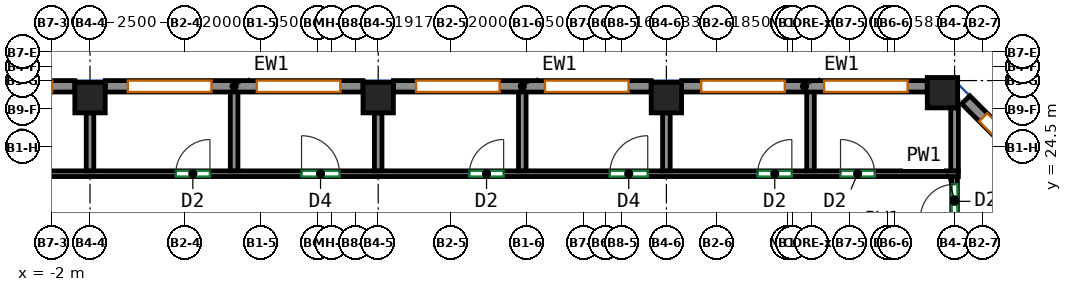
"""IFC4 building model, lengths in metres.
Left out: names, types, materials, properties, quantities, classifications, styles, units other than length and angle.
Written with IfcOpenShell. Run it as: python <this file> out.ifc"""

import sys

from ifc_helpers import new_model, si_unit, direction, frame, frame_2d, origin, origin_2d, place, context, subcontext, project, spatial, rectangle, extrude, source, transform, mapped, element, fill, save


model = new_model("IFC4")
c1 = context("Model", 3, precision=1e-05, world=origin(), true_north=direction((0.0, 1.0)))
c2 = subcontext(c1, "Body", "Model", "MODEL_VIEW")
j1 = project(units=[si_unit("LENGTHUNIT", "METRE"), si_unit("PLANEANGLEUNIT", "RADIAN")], contexts=[c1])
p1 = place(None, origin())
s1 = spatial("IfcSite", under=j1, at=p1, CompositionType="ELEMENT")
p2 = place(p1, origin())
s2 = spatial("IfcBuilding", under=s1, at=p2, CompositionType="ELEMENT")
p3 = place(p2, frame((0.0, 0.0, 171.9)))
s3 = spatial("IfcBuildingStorey", under=s2, at=p3, CompositionType="ELEMENT", Elevation=171.9)
m1 = source(origin(), c2, "Body", "SweptSolid", [
    extrude(rectangle(XDim=0.8, YDim=0.8, at=origin_2d()), origin(), (0.0, 0.0, 1.0), 3.12),
])
for number, where, z_axis, x_axis in (
    (1, (-1.0, 25.8, 0.0), (0.0, 0.0, 1.0), (1.0, 0.0, 0.0)),
    (2, (6.583, 25.8, 0.0), (0.0, 0.0, 1.0), (1.0, 0.0, 0.0)),
    (3, (14.167, 25.8, 0.0), (0.0, 0.0, 1.0), (1.0, 0.0, 0.0)),
    (4, (21.432, 25.932, 0.0), (0.0, 0.0, 1.0), (1.0, 0.0, 0.0)),
):
    element("IfcColumn", number, at=place(p3, frame(where, z_axis=z_axis, x_axis=x_axis)), inside=s3, PredefinedType="COLUMN", context=c2, shape_type="MappedRepresentation", body=[
        mapped(m1, transform((0.0, 0.0, 0.0))),
    ])
m2 = source(origin(), c2, "Body", "SweptSolid", [
    extrude(rectangle(XDim=3.5, YDim=0.3, at=frame_2d((1.75, 0.0))), origin(), (0.0, 0.0, 1.0), 3.12),
])
p4 = place(p3, frame((24.519, 23.269, 0.0), z_axis=(0.0, 0.0, 1.0), x_axis=(-0.70707190453, 0.707141656123, 0.0)))
e5 = element("IfcWall", 5, at=p4, inside=s3, PredefinedType="SOLIDWALL", context=c2, shape_type="MappedRepresentation", body=[
    mapped(m2, transform((0.0, 0.0, 0.0))),
])
p5 = place(p4, frame((0.65, 0.0, 0.85)))
e6 = element("IfcOpeningElement", 6, at=p5, cuts=e5, PredefinedType="OPENING", context=c2, shape_type="SweptSolid", body=[
    extrude(rectangle(XDim=2.2, YDim=1.95, at=frame_2d((1.1, 0.975))), frame((0.0, 0.16, 0.0), z_axis=(0.0, -1.0, 0.0), x_axis=(1.0, 0.0, 0.0)), (0.0, 0.0, 1.0), 0.32),
])
m3 = source(origin(), c2, "Body", "SweptSolid", [
    extrude(rectangle(XDim=6.465, YDim=0.3, at=frame_2d((3.232, 0.0))), origin(), (0.0, 0.0, 1.0), 3.12),
])
p6 = place(p3, frame((21.032, 26.1, 0.0), z_axis=(0.0, 0.0, 1.0), x_axis=(-1.0, 0.0, 0.0)))
e7 = element("IfcWall", 7, at=p6, inside=s3, PredefinedType="SOLIDWALL", context=c2, shape_type="MappedRepresentation", body=[
    mapped(m3, transform((0.0, 0.0, 0.0))),
])
p7 = place(p6, frame((0.516, 0.0, 0.85)))
e8 = element("IfcOpeningElement", 8, at=p7, cuts=e7, PredefinedType="OPENING", context=c2, shape_type="SweptSolid", body=[
    extrude(rectangle(XDim=2.2, YDim=1.95, at=frame_2d((1.1, 0.975))), frame((0.0, 0.16, 0.0), z_axis=(0.0, -1.0, 0.0), x_axis=(1.0, 0.0, 0.0)), (0.0, 0.0, 1.0), 0.32),
])
p8 = place(p6, frame((3.749, 0.0, 0.85)))
e9 = element("IfcOpeningElement", 9, at=p8, cuts=e7, PredefinedType="OPENING", context=c2, shape_type="SweptSolid", body=[
    extrude(rectangle(XDim=2.2, YDim=1.95, at=frame_2d((1.1, 0.975))), frame((0.0, 0.16, 0.0), z_axis=(0.0, -1.0, 0.0), x_axis=(1.0, 0.0, 0.0)), (0.0, 0.0, 1.0), 0.32),
])
m4 = source(origin(), c2, "Body", "SweptSolid", [
    extrude(rectangle(XDim=6.783, YDim=0.3, at=frame_2d((3.392, 0.0))), origin(), (0.0, 0.0, 1.0), 3.12),
])
p9 = place(p3, frame((13.767, 26.1, 0.0), z_axis=(0.0, 0.0, 1.0), x_axis=(-1.0, 0.0, 0.0)))
e10 = element("IfcWall", 10, at=p9, inside=s3, PredefinedType="SOLIDWALL", context=c2, shape_type="MappedRepresentation", body=[
    mapped(m4, transform((0.0, 0.0, 0.0))),
])
p10 = place(p9, frame((0.596, 0.0, 0.85)))
e11 = element("IfcOpeningElement", 11, at=p10, cuts=e10, PredefinedType="OPENING", context=c2, shape_type="SweptSolid", body=[
    extrude(rectangle(XDim=2.2, YDim=1.95, at=frame_2d((1.1, 0.975))), frame((0.0, 0.16, 0.0), z_axis=(0.0, -1.0, 0.0), x_axis=(1.0, 0.0, 0.0)), (0.0, 0.0, 1.0), 0.32),
])
p11 = place(p9, frame((3.988, 0.0, 0.85)))
e12 = element("IfcOpeningElement", 12, at=p11, cuts=e10, PredefinedType="OPENING", context=c2, shape_type="SweptSolid", body=[
    extrude(rectangle(XDim=2.2, YDim=1.95, at=frame_2d((1.1, 0.975))), frame((0.0, 0.16, 0.0), z_axis=(0.0, -1.0, 0.0), x_axis=(1.0, 0.0, 0.0)), (0.0, 0.0, 1.0), 0.32),
])
m5 = source(origin(), c2, "Body", "SweptSolid", [
    extrude(rectangle(XDim=6.783, YDim=0.3, at=frame_2d((3.392, 0.0))), origin(), (0.0, 0.0, 1.0), 3.12),
])
p12 = place(p3, frame((6.183, 26.1, 0.0), z_axis=(0.0, 0.0, 1.0), x_axis=(-1.0, 0.0, 0.0)))
e13 = element("IfcWall", 13, at=p12, inside=s3, PredefinedType="SOLIDWALL", context=c2, shape_type="MappedRepresentation", body=[
    mapped(m5, transform((0.0, 0.0, 0.0))),
])
p13 = place(p12, frame((0.596, 0.0, 0.85)))
e14 = element("IfcOpeningElement", 14, at=p13, cuts=e13, PredefinedType="OPENING", context=c2, shape_type="SweptSolid", body=[
    extrude(rectangle(XDim=2.2, YDim=1.95, at=frame_2d((1.1, 0.975))), frame((0.0, 0.16, 0.0), z_axis=(0.0, -1.0, 0.0), x_axis=(1.0, 0.0, 0.0)), (0.0, 0.0, 1.0), 0.32),
])
p14 = place(p12, frame((3.988, 0.0, 0.85)))
e15 = element("IfcOpeningElement", 15, at=p14, cuts=e13, PredefinedType="OPENING", context=c2, shape_type="SweptSolid", body=[
    extrude(rectangle(XDim=2.2, YDim=1.95, at=frame_2d((1.1, 0.975))), frame((0.0, 0.16, 0.0), z_axis=(0.0, -1.0, 0.0), x_axis=(1.0, 0.0, 0.0)), (0.0, 0.0, 1.0), 0.32),
])
p15 = place(p3, frame((-1.4, 26.1, 0.0), z_axis=(0.0, 0.0, 1.0), x_axis=(-1.0, 0.0, 0.0)))
e16 = element("IfcWall", 16, at=p15, inside=s3, PredefinedType="SOLIDWALL", context=c2, shape_type="MappedRepresentation", body=[
    mapped(m5, transform((0.0, 0.0, 0.0))),
])
p16 = place(p15, frame((0.596, 0.0, 0.85)))
e17 = element("IfcOpeningElement", 17, at=p16, cuts=e16, PredefinedType="OPENING", context=c2, shape_type="SweptSolid", body=[
    extrude(rectangle(XDim=2.2, YDim=1.95, at=frame_2d((1.1, 0.975))), frame((0.0, 0.16, 0.0), z_axis=(0.0, -1.0, 0.0), x_axis=(1.0, 0.0, 0.0)), (0.0, 0.0, 1.0), 0.32),
])
p17 = place(p15, frame((3.988, 0.0, 0.85)))
e18 = element("IfcOpeningElement", 18, at=p17, cuts=e16, PredefinedType="OPENING", context=c2, shape_type="SweptSolid", body=[
    extrude(rectangle(XDim=2.2, YDim=1.95, at=frame_2d((1.1, 0.975))), frame((0.0, 0.16, 0.0), z_axis=(0.0, -1.0, 0.0), x_axis=(1.0, 0.0, 0.0)), (0.0, 0.0, 1.0), 0.32),
])
p18 = place(p3, frame((21.75, 22.503, 0.0), z_axis=(0.0, 0.0, 1.0), x_axis=(0.0, 1.0, 0.0)))
e19 = element("IfcWall", 19, at=p18, inside=s3, PredefinedType="PARTITIONING", context=c2, shape_type="SweptSolid", body=[
    extrude(rectangle(XDim=1.222, YDim=0.15, at=frame_2d((0.611, 0.0))), origin(), (0.0, 0.0, 1.0), 3.12),
])
p19 = place(p18, frame((0.12, 0.0, 0.0)))
e20 = element("IfcOpeningElement", 20, at=p19, cuts=e19, PredefinedType="OPENING", context=c2, shape_type="SweptSolid", body=[
    extrude(rectangle(XDim=0.9, YDim=2.1, at=frame_2d((0.45, 1.05))), frame((0.0, 0.085, 0.0), z_axis=(0.0, -1.0, 0.0), x_axis=(1.0, 0.0, 0.0)), (0.0, 0.0, 1.0), 0.17),
])
p20 = place(p3, frame((-20.059, 23.8, 0.0), z_axis=(0.0, 0.0, 1.0), x_axis=(1.0, 0.0, 0.0)))
e21 = element("IfcWall", 21, at=p20, inside=s3, PredefinedType="PARTITIONING", context=c2, shape_type="SweptSolid", body=[
    extrude(rectangle(XDim=41.909, YDim=0.15, at=frame_2d((20.955, 0.0))), origin(), (0.0, 0.0, 1.0), 3.12),
])
p21 = place(p20, frame((2.101, 0.0, 0.0)))
e22 = element("IfcOpeningElement", 22, at=p21, cuts=e21, PredefinedType="OPENING", context=c2, shape_type="SweptSolid", body=[
    extrude(rectangle(XDim=0.9, YDim=2.1, at=frame_2d((0.45, 1.05))), frame((0.0, 0.085, 0.0), z_axis=(0.0, -1.0, 0.0), x_axis=(1.0, 0.0, 0.0)), (0.0, 0.0, 1.0), 0.17),
])
p22 = place(p20, frame((4.585, 0.0, 0.0)))
e23 = element("IfcOpeningElement", 23, at=p22, cuts=e21, PredefinedType="OPENING", context=c2, shape_type="SweptSolid", body=[
    extrude(rectangle(XDim=1.0, YDim=2.1, at=frame_2d((0.5, 1.05))), frame((0.0, 0.085, 0.0), z_axis=(0.0, -1.0, 0.0), x_axis=(1.0, 0.0, 0.0)), (0.0, 0.0, 1.0), 0.17),
])
p23 = place(p20, frame((8.175, 0.0, 0.0)))
e24 = element("IfcOpeningElement", 24, at=p23, cuts=e21, PredefinedType="OPENING", context=c2, shape_type="SweptSolid", body=[
    extrude(rectangle(XDim=0.9, YDim=2.1, at=frame_2d((0.45, 1.05))), frame((0.0, 0.085, 0.0), z_axis=(0.0, -1.0, 0.0), x_axis=(1.0, 0.0, 0.0)), (0.0, 0.0, 1.0), 0.17),
])
p24 = place(p20, frame((13.173, 0.0, 0.0)))
e25 = element("IfcOpeningElement", 25, at=p24, cuts=e21, PredefinedType="OPENING", context=c2, shape_type="SweptSolid", body=[
    extrude(rectangle(XDim=1.0, YDim=2.1, at=frame_2d((0.5, 1.05))), frame((0.0, 0.085, 0.0), z_axis=(0.0, -1.0, 0.0), x_axis=(1.0, 0.0, 0.0)), (0.0, 0.0, 1.0), 0.17),
])
p25 = place(p20, frame((15.658, 0.0, 0.0)))
e26 = element("IfcOpeningElement", 26, at=p25, cuts=e21, PredefinedType="OPENING", context=c2, shape_type="SweptSolid", body=[
    extrude(rectangle(XDim=0.9, YDim=2.1, at=frame_2d((0.45, 1.05))), frame((0.0, 0.085, 0.0), z_axis=(0.0, -1.0, 0.0), x_axis=(1.0, 0.0, 0.0)), (0.0, 0.0, 1.0), 0.17),
])
p26 = place(p20, frame((21.315, 0.0, 0.0)))
e27 = element("IfcOpeningElement", 27, at=p26, cuts=e21, PredefinedType="OPENING", context=c2, shape_type="SweptSolid", body=[
    extrude(rectangle(XDim=0.9, YDim=2.1, at=frame_2d((0.45, 1.05))), frame((0.0, 0.085, 0.0), z_axis=(0.0, -1.0, 0.0), x_axis=(1.0, 0.0, 0.0)), (0.0, 0.0, 1.0), 0.17),
])
p27 = place(p20, frame((24.625, 0.0, 0.0)))
e28 = element("IfcOpeningElement", 28, at=p27, cuts=e21, PredefinedType="OPENING", context=c2, shape_type="SweptSolid", body=[
    extrude(rectangle(XDim=1.0, YDim=2.1, at=frame_2d((0.5, 1.05))), frame((0.0, 0.085, 0.0), z_axis=(0.0, -1.0, 0.0), x_axis=(1.0, 0.0, 0.0)), (0.0, 0.0, 1.0), 0.17),
])
p28 = place(p20, frame((29.043, 0.0, 0.0)))
e29 = element("IfcOpeningElement", 29, at=p28, cuts=e21, PredefinedType="OPENING", context=c2, shape_type="SweptSolid", body=[
    extrude(rectangle(XDim=0.9, YDim=2.1, at=frame_2d((0.45, 1.05))), frame((0.0, 0.085, 0.0), z_axis=(0.0, -1.0, 0.0), x_axis=(1.0, 0.0, 0.0)), (0.0, 0.0, 1.0), 0.17),
])
p29 = place(p20, frame((32.735, 0.0, 0.0)))
e30 = element("IfcOpeningElement", 30, at=p29, cuts=e21, PredefinedType="OPENING", context=c2, shape_type="SweptSolid", body=[
    extrude(rectangle(XDim=1.0, YDim=2.1, at=frame_2d((0.5, 1.05))), frame((0.0, 0.085, 0.0), z_axis=(0.0, -1.0, 0.0), x_axis=(1.0, 0.0, 0.0)), (0.0, 0.0, 1.0), 0.17),
])
p30 = place(p20, frame((36.627, 0.0, 0.0)))
e31 = element("IfcOpeningElement", 31, at=p30, cuts=e21, PredefinedType="OPENING", context=c2, shape_type="SweptSolid", body=[
    extrude(rectangle(XDim=0.9, YDim=2.1, at=frame_2d((0.45, 1.05))), frame((0.0, 0.085, 0.0), z_axis=(0.0, -1.0, 0.0), x_axis=(1.0, 0.0, 0.0)), (0.0, 0.0, 1.0), 0.17),
])
p31 = place(p20, frame((38.808, 0.0, 0.0)))
e32 = element("IfcOpeningElement", 32, at=p31, cuts=e21, PredefinedType="OPENING", context=c2, shape_type="SweptSolid", body=[
    extrude(rectangle(XDim=0.9, YDim=2.1, at=frame_2d((0.45, 1.05))), frame((0.0, 0.085, 0.0), z_axis=(0.0, -1.0, 0.0), x_axis=(1.0, 0.0, 0.0)), (0.0, 0.0, 1.0), 0.17),
])
p32 = place(p3, frame((21.75, 25.532, 0.0), z_axis=(0.0, 0.0, 1.0), x_axis=(0.0, -1.0, 0.0)))
e33 = element("IfcWall", 33, at=p32, inside=s3, PredefinedType="PARTITIONING", context=c2, shape_type="SweptSolid", body=[
    extrude(rectangle(XDim=1.655, YDim=0.2, at=frame_2d((0.828, 0.0))), origin(), (0.0, 0.0, 1.0), 3.12),
])
p33 = place(p3, frame((-1.0, 23.877, 0.0), z_axis=(0.0, 0.0, 1.0), x_axis=(0.0, 1.0, 0.0)))
e34 = element("IfcWall", 34, at=p33, inside=s3, PredefinedType="PARTITIONING", context=c2, shape_type="SweptSolid", body=[
    extrude(rectangle(XDim=1.523, YDim=0.2, at=frame_2d((0.761, 0.0))), origin(), (0.0, 0.0, 1.0), 3.12),
])
p34 = place(p3, frame((2.792, 23.877, 0.0), z_axis=(0.0, 0.0, 1.0), x_axis=(0.0, 1.0, 0.0)))
e35 = element("IfcWall", 35, at=p34, inside=s3, PredefinedType="PARTITIONING", context=c2, shape_type="SweptSolid", body=[
    extrude(rectangle(XDim=2.123, YDim=0.2, at=frame_2d((1.062, 0.0))), origin(), (0.0, 0.0, 1.0), 3.12),
])
p35 = place(p3, frame((6.583, 23.877, 0.0), z_axis=(0.0, 0.0, 1.0), x_axis=(0.0, 1.0, 0.0)))
e36 = element("IfcWall", 36, at=p35, inside=s3, PredefinedType="PARTITIONING", context=c2, shape_type="SweptSolid", body=[
    extrude(rectangle(XDim=1.523, YDim=0.2, at=frame_2d((0.761, 0.0))), origin(), (0.0, 0.0, 1.0), 3.12),
])
p36 = place(p3, frame((10.375, 23.877, 0.0), z_axis=(0.0, 0.0, 1.0), x_axis=(0.0, 1.0, 0.0)))
e37 = element("IfcWall", 37, at=p36, inside=s3, PredefinedType="PARTITIONING", context=c2, shape_type="SweptSolid", body=[
    extrude(rectangle(XDim=2.123, YDim=0.2, at=frame_2d((1.062, 0.0))), origin(), (0.0, 0.0, 1.0), 3.12),
])
p37 = place(p3, frame((14.167, 23.877, 0.0), z_axis=(0.0, 0.0, 1.0), x_axis=(0.0, 1.0, 0.0)))
e38 = element("IfcWall", 38, at=p37, inside=s3, PredefinedType="PARTITIONING", context=c2, shape_type="SweptSolid", body=[
    extrude(rectangle(XDim=1.523, YDim=0.2, at=frame_2d((0.761, 0.0))), origin(), (0.0, 0.0, 1.0), 3.12),
])
p38 = place(p3, frame((17.959, 23.877, 0.0), z_axis=(0.0, 0.0, 1.0), x_axis=(0.0, 1.0, 0.0)))
e39 = element("IfcWall", 39, at=p38, inside=s3, PredefinedType="PARTITIONING", context=c2, shape_type="SweptSolid", body=[
    extrude(rectangle(XDim=2.123, YDim=0.2, at=frame_2d((1.062, 0.0))), origin(), (0.0, 0.0, 1.0), 3.12),
])
p39 = place(p5, origin())
e40 = element("IfcWindow", 40, at=p39, inside=s3, PartitioningType="SINGLE_PANEL", PredefinedType="WINDOW", context=c2, shape_type="SweptSolid", body=[
    extrude(rectangle(XDim=2.2, YDim=1.95, at=frame_2d((1.1, 0.975))), frame((0.0, 0.03, 0.0), z_axis=(0.0, -1.0, 0.0), x_axis=(1.0, 0.0, 0.0)), (0.0, 0.0, 1.0), 0.06),
])
fill(e6, e40)
p40 = place(p7, origin())
e41 = element("IfcWindow", 41, at=p40, inside=s3, PartitioningType="SINGLE_PANEL", PredefinedType="WINDOW", context=c2, shape_type="SweptSolid", body=[
    extrude(rectangle(XDim=2.2, YDim=1.95, at=frame_2d((1.1, 0.975))), frame((0.0, 0.03, 0.0), z_axis=(0.0, -1.0, 0.0), x_axis=(1.0, 0.0, 0.0)), (0.0, 0.0, 1.0), 0.06),
])
fill(e8, e41)
p41 = place(p8, origin())
e42 = element("IfcWindow", 42, at=p41, inside=s3, PartitioningType="SINGLE_PANEL", PredefinedType="WINDOW", context=c2, shape_type="SweptSolid", body=[
    extrude(rectangle(XDim=2.2, YDim=1.95, at=frame_2d((1.1, 0.975))), frame((0.0, 0.03, 0.0), z_axis=(0.0, -1.0, 0.0), x_axis=(1.0, 0.0, 0.0)), (0.0, 0.0, 1.0), 0.06),
])
fill(e9, e42)
p42 = place(p10, origin())
e43 = element("IfcWindow", 43, at=p42, inside=s3, PartitioningType="SINGLE_PANEL", PredefinedType="WINDOW", context=c2, shape_type="SweptSolid", body=[
    extrude(rectangle(XDim=2.2, YDim=1.95, at=frame_2d((1.1, 0.975))), frame((0.0, 0.03, 0.0), z_axis=(0.0, -1.0, 0.0), x_axis=(1.0, 0.0, 0.0)), (0.0, 0.0, 1.0), 0.06),
])
fill(e11, e43)
p43 = place(p11, origin())
e44 = element("IfcWindow", 44, at=p43, inside=s3, PartitioningType="SINGLE_PANEL", PredefinedType="WINDOW", context=c2, shape_type="SweptSolid", body=[
    extrude(rectangle(XDim=2.2, YDim=1.95, at=frame_2d((1.1, 0.975))), frame((0.0, 0.03, 0.0), z_axis=(0.0, -1.0, 0.0), x_axis=(1.0, 0.0, 0.0)), (0.0, 0.0, 1.0), 0.06),
])
fill(e12, e44)
p44 = place(p13, origin())
e45 = element("IfcWindow", 45, at=p44, inside=s3, PartitioningType="SINGLE_PANEL", PredefinedType="WINDOW", context=c2, shape_type="SweptSolid", body=[
    extrude(rectangle(XDim=2.2, YDim=1.95, at=frame_2d((1.1, 0.975))), frame((0.0, 0.03, 0.0), z_axis=(0.0, -1.0, 0.0), x_axis=(1.0, 0.0, 0.0)), (0.0, 0.0, 1.0), 0.06),
])
fill(e14, e45)
p45 = place(p14, origin())
e46 = element("IfcWindow", 46, at=p45, inside=s3, PartitioningType="SINGLE_PANEL", PredefinedType="WINDOW", context=c2, shape_type="SweptSolid", body=[
    extrude(rectangle(XDim=2.2, YDim=1.95, at=frame_2d((1.1, 0.975))), frame((0.0, 0.03, 0.0), z_axis=(0.0, -1.0, 0.0), x_axis=(1.0, 0.0, 0.0)), (0.0, 0.0, 1.0), 0.06),
])
fill(e15, e46)
p46 = place(p16, origin())
e47 = element("IfcWindow", 47, at=p46, inside=s3, PartitioningType="SINGLE_PANEL", PredefinedType="WINDOW", context=c2, shape_type="SweptSolid", body=[
    extrude(rectangle(XDim=2.2, YDim=1.95, at=frame_2d((1.1, 0.975))), frame((0.0, 0.03, 0.0), z_axis=(0.0, -1.0, 0.0), x_axis=(1.0, 0.0, 0.0)), (0.0, 0.0, 1.0), 0.06),
])
fill(e17, e47)
p47 = place(p19, origin())
e48 = element("IfcDoor", 48, at=p47, inside=s3, OperationType="SINGLE_SWING_LEFT", PredefinedType="DOOR", context=c2, shape_type="SweptSolid", body=[
    extrude(rectangle(XDim=0.9, YDim=2.1, at=frame_2d((0.45, 1.05))), frame((0.0, 0.025, 0.0), z_axis=(0.0, -1.0, 0.0), x_axis=(1.0, 0.0, 0.0)), (0.0, 0.0, 1.0), 0.05),
])
fill(e20, e48)
p48 = place(p26, origin())
e49 = element("IfcDoor", 49, at=p48, inside=s3, OperationType="SINGLE_SWING_RIGHT", PredefinedType="DOOR", context=c2, shape_type="SweptSolid", body=[
    extrude(rectangle(XDim=0.9, YDim=2.1, at=frame_2d((0.45, 1.05))), frame((0.0, 0.025, 0.0), z_axis=(0.0, -1.0, 0.0), x_axis=(1.0, 0.0, 0.0)), (0.0, 0.0, 1.0), 0.05),
])
fill(e27, e49)
p49 = place(p27, origin())
e50 = element("IfcDoor", 50, at=p49, inside=s3, OperationType="SINGLE_SWING_LEFT", PredefinedType="DOOR", context=c2, shape_type="SweptSolid", body=[
    extrude(rectangle(XDim=1.0, YDim=2.1, at=frame_2d((0.5, 1.05))), frame((0.0, 0.025, 0.0), z_axis=(0.0, -1.0, 0.0), x_axis=(1.0, 0.0, 0.0)), (0.0, 0.0, 1.0), 0.05),
])
fill(e28, e50)
p50 = place(p28, origin())
e51 = element("IfcDoor", 51, at=p50, inside=s3, OperationType="SINGLE_SWING_RIGHT", PredefinedType="DOOR", context=c2, shape_type="SweptSolid", body=[
    extrude(rectangle(XDim=0.9, YDim=2.1, at=frame_2d((0.45, 1.05))), frame((0.0, 0.025, 0.0), z_axis=(0.0, -1.0, 0.0), x_axis=(1.0, 0.0, 0.0)), (0.0, 0.0, 1.0), 0.05),
])
fill(e29, e51)
p51 = place(p29, origin())
e52 = element("IfcDoor", 52, at=p51, inside=s3, OperationType="SINGLE_SWING_RIGHT", PredefinedType="DOOR", context=c2, shape_type="SweptSolid", body=[
    extrude(rectangle(XDim=1.0, YDim=2.1, at=frame_2d((0.5, 1.05))), frame((0.0, 0.025, 0.0), z_axis=(0.0, -1.0, 0.0), x_axis=(1.0, 0.0, 0.0)), (0.0, 0.0, 1.0), 0.05),
])
fill(e30, e52)
p52 = place(p30, origin())
e53 = element("IfcDoor", 53, at=p52, inside=s3, OperationType="SINGLE_SWING_RIGHT", PredefinedType="DOOR", context=c2, shape_type="SweptSolid", body=[
    extrude(rectangle(XDim=0.9, YDim=2.1, at=frame_2d((0.45, 1.05))), frame((0.0, 0.025, 0.0), z_axis=(0.0, -1.0, 0.0), x_axis=(1.0, 0.0, 0.0)), (0.0, 0.0, 1.0), 0.05),
])
fill(e31, e53)
p53 = place(p31, origin())
e54 = element("IfcDoor", 54, at=p53, inside=s3, OperationType="SINGLE_SWING_LEFT", PredefinedType="DOOR", context=c2, shape_type="SweptSolid", body=[
    extrude(rectangle(XDim=0.9, YDim=2.1, at=frame_2d((0.45, 1.05))), frame((0.0, 0.025, 0.0), z_axis=(0.0, -1.0, 0.0), x_axis=(1.0, 0.0, 0.0)), (0.0, 0.0, 1.0), 0.05),
])
fill(e32, e54)
save(model, sys.argv[1])
